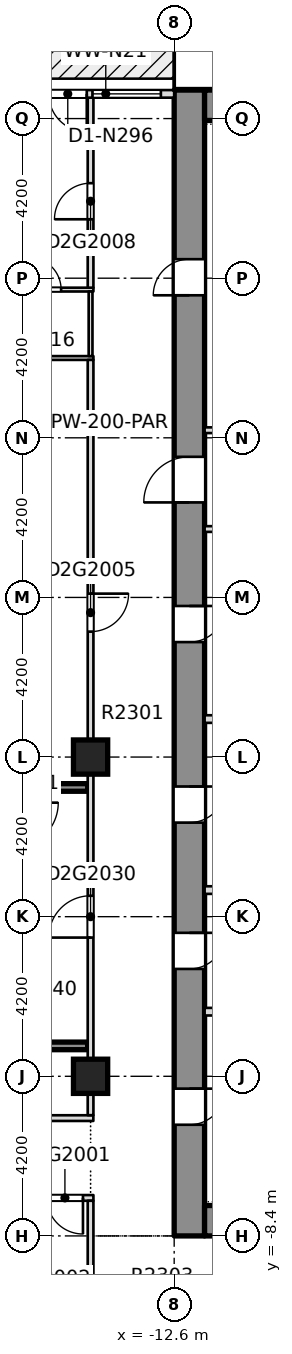
"""IFC4 building model, lengths in metres.
Left out: names, types, materials, properties, quantities, classifications, styles, units other than length and angle.
Written with IfcOpenShell. Run it as: python <this file> out.ifc"""

import sys

from ifc_helpers import new_model, si_unit, direction, frame, frame_2d, origin, origin_2d, place, context, subcontext, project, spatial, rectangle, extrude, element, fill, save


model = new_model("IFC4")
c1 = context("Model", 3, precision=1e-05, world=origin(), true_north=direction((0.0, 1.0)))
c2 = subcontext(c1, "Body", "Model", "MODEL_VIEW")
j1 = project(units=[si_unit("LENGTHUNIT", "METRE"), si_unit("PLANEANGLEUNIT", "RADIAN")], contexts=[c1])
p1 = place(None, origin())
s1 = spatial("IfcSite", under=j1, at=p1, CompositionType="ELEMENT")
p2 = place(p1, origin())
s2 = spatial("IfcBuilding", under=s1, at=p2, CompositionType="ELEMENT")
p3 = place(p2, frame((0.0, 0.0, 94.2)))
s3 = spatial("IfcBuildingStorey", under=s2, at=p3, CompositionType="ELEMENT", Elevation=94.2)
p4 = place(p3, frame((-12.2, -8.4, -0.32), z_axis=(0.0, 0.0, 1.0), x_axis=(0.0, 1.0, 0.0)))
e1 = element("IfcWall", 1, at=p4, inside=s3, PredefinedType="SHEAR", context=c2, shape_type="SweptSolid", body=[
    extrude(rectangle(XDim=30.15, YDim=0.8, at=frame_2d((15.075, 0.0))), origin(), (0.0, 0.0, 1.0), 3.45),
])
p5 = place(p4, frame((2.925, 0.0, 0.32)))
e2 = element("IfcOpeningElement", 2, at=p5, cuts=e1, PredefinedType="OPENING", context=c2, shape_type="SweptSolid", body=[
    extrude(rectangle(XDim=0.95, YDim=2.1, at=frame_2d((0.475, 1.05))), frame((0.0, 0.41, 0.0), z_axis=(0.0, -1.0, 0.0), x_axis=(1.0, 0.0, 0.0)), (0.0, 0.0, 1.0), 0.82),
])
p6 = place(p4, frame((7.025, 0.0, 0.32)))
e3 = element("IfcOpeningElement", 3, at=p6, cuts=e1, PredefinedType="OPENING", context=c2, shape_type="SweptSolid", body=[
    extrude(rectangle(XDim=0.95, YDim=2.1, at=frame_2d((0.475, 1.05))), frame((0.0, 0.41, 0.0), z_axis=(0.0, -1.0, 0.0), x_axis=(1.0, 0.0, 0.0)), (0.0, 0.0, 1.0), 0.82),
])
p7 = place(p4, frame((10.875, 0.0, 0.32)))
e4 = element("IfcOpeningElement", 4, at=p7, cuts=e1, PredefinedType="OPENING", context=c2, shape_type="SweptSolid", body=[
    extrude(rectangle(XDim=0.95, YDim=2.1, at=frame_2d((0.475, 1.05))), frame((0.0, 0.41, 0.0), z_axis=(0.0, -1.0, 0.0), x_axis=(1.0, 0.0, 0.0)), (0.0, 0.0, 1.0), 0.82),
])
p8 = place(p4, frame((15.625, 0.0, 0.32)))
e5 = element("IfcOpeningElement", 5, at=p8, cuts=e1, PredefinedType="OPENING", context=c2, shape_type="SweptSolid", body=[
    extrude(rectangle(XDim=0.95, YDim=2.1, at=frame_2d((0.475, 1.05))), frame((0.0, 0.41, 0.0), z_axis=(0.0, -1.0, 0.0), x_axis=(1.0, 0.0, 0.0)), (0.0, 0.0, 1.0), 0.82),
])
p9 = place(p4, frame((24.75, 0.0, 0.32)))
e6 = element("IfcOpeningElement", 6, at=p9, cuts=e1, PredefinedType="OPENING", context=c2, shape_type="SweptSolid", body=[
    extrude(rectangle(XDim=0.95, YDim=2.1, at=frame_2d((0.475, 1.05))), frame((0.0, 0.41, 0.0), z_axis=(0.0, -1.0, 0.0), x_axis=(1.0, 0.0, 0.0)), (0.0, 0.0, 1.0), 0.82),
])
p10 = place(p4, frame((19.3, 0.0, 0.32)))
e7 = element("IfcOpeningElement", 7, at=p10, cuts=e1, PredefinedType="OPENING", context=c2, shape_type="SweptSolid", body=[
    extrude(rectangle(XDim=1.2, YDim=2.1, at=frame_2d((0.6, 1.05))), frame((0.0, 0.41, 0.0), z_axis=(0.0, -1.0, 0.0), x_axis=(1.0, 0.0, 0.0)), (0.0, 0.0, 1.0), 0.82),
])
p11 = place(p3, frame((-11.8, -8.0, -0.32), z_axis=(0.0, 0.0, 1.0), x_axis=(1.0, 0.0, 0.0)))
e8 = element("IfcWall", 8, at=p11, inside=s3, PredefinedType="SHEAR", context=c2, shape_type="SweptSolid", body=[
    extrude(rectangle(XDim=23.6, YDim=0.8, at=frame_2d((11.8, 0.0))), origin(), (0.0, 0.0, 1.0), 3.45),
])
p12 = place(p11, frame((7.05, 0.0, 0.32)))
e9 = element("IfcOpeningElement", 9, at=p12, cuts=e8, PredefinedType="OPENING", context=c2, shape_type="SweptSolid", body=[
    extrude(rectangle(XDim=1.8, YDim=2.1, at=frame_2d((0.9, 1.05))), frame((0.0, 0.41, 0.0), z_axis=(0.0, -1.0, 0.0), x_axis=(1.0, 0.0, 0.0)), (0.0, 0.0, 1.0), 0.82),
])
p13 = place(p11, frame((14.75, 0.0, 0.32)))
e10 = element("IfcOpeningElement", 10, at=p13, cuts=e8, PredefinedType="OPENING", context=c2, shape_type="SweptSolid", body=[
    extrude(rectangle(XDim=1.8, YDim=2.1, at=frame_2d((0.9, 1.05))), frame((0.0, 0.41, 0.0), z_axis=(0.0, -1.0, 0.0), x_axis=(1.0, 0.0, 0.0)), (0.0, 0.0, 1.0), 0.82),
])
p14 = place(p3, frame((-11.8, 21.35, -0.32), z_axis=(0.0, 0.0, 1.0), x_axis=(1.0, 0.0, 0.0)))
e11 = element("IfcWall", 11, at=p14, inside=s3, PredefinedType="SHEAR", context=c2, shape_type="SweptSolid", body=[
    extrude(rectangle(XDim=23.6, YDim=0.8, at=frame_2d((11.8, 0.0))), origin(), (0.0, 0.0, 1.0), 3.45),
])
for number, where, z_axis, x_axis in (
    (12, (-14.8, -4.2, -0.32), (0.0, 0.0, 1.0), (1.0, 0.0, 0.0)),
    (13, (-14.8, 4.2, -0.32), (0.0, 0.0, 1.0), (1.0, 0.0, 0.0)),
):
    element("IfcColumn", number, at=place(p3, frame(where, z_axis=z_axis, x_axis=x_axis)), inside=s3, PredefinedType="COLUMN", context=c2, shape_type="SweptSolid", body=[
        extrude(rectangle(XDim=0.9, YDim=0.9, at=origin_2d()), origin(), (0.0, 0.0, 1.0), 3.45),
    ])
p15 = place(p3, frame((-25.75, -7.4, 0.0), z_axis=(0.0, 0.0, 1.0), x_axis=(1.0, 0.0, 0.0)))
e14 = element("IfcWall", 14, at=p15, inside=s3, PredefinedType="PARTITIONING", context=c2, shape_type="SweptSolid", body=[
    extrude(rectangle(XDim=11.025, YDim=0.15, at=frame_2d((5.512, 0.0))), origin(), (0.0, 0.0, 1.0), 3.13),
])
p16 = place(p15, frame((9.8, 0.0, 0.0)))
e15 = element("IfcOpeningElement", 15, at=p16, cuts=e14, PredefinedType="OPENING", context=c2, shape_type="SweptSolid", body=[
    extrude(rectangle(XDim=0.95, YDim=2.1, at=frame_2d((0.475, 1.05))), frame((0.0, 0.085, 0.0), z_axis=(0.0, -1.0, 0.0), x_axis=(1.0, 0.0, 0.0)), (0.0, 0.0, 1.0), 0.17),
])
p17 = place(p3, frame((-25.75, -5.3, 0.0), z_axis=(0.0, 0.0, 1.0), x_axis=(1.0, 0.0, 0.0)))
e16 = element("IfcWall", 16, at=p17, inside=s3, PredefinedType="PARTITIONING", context=c2, shape_type="SweptSolid", body=[
    extrude(rectangle(XDim=11.023, YDim=0.15, at=frame_2d((5.511, 0.0))), origin(), (0.0, 0.0, 1.0), 3.13),
])
p18 = place(p3, frame((-20.4, -3.4, 0.0), z_axis=(0.0, 0.0, 1.0), x_axis=(1.0, 0.0, 0.0)))
e17 = element("IfcWall", 17, at=p18, inside=s3, PredefinedType="SOLIDWALL", context=c2, shape_type="SweptSolid", body=[
    extrude(rectangle(XDim=5.523, YDim=0.2, at=frame_2d((2.761, 0.0))), origin(), (0.0, 0.0, 1.0), 3.13),
])
p19 = place(p3, frame((-20.45, 3.4, 0.0), z_axis=(0.0, 0.0, 1.0), x_axis=(1.0, 0.0, 0.0)))
e18 = element("IfcWall", 18, at=p19, inside=s3, PredefinedType="SOLIDWALL", context=c2, shape_type="SweptSolid", body=[
    extrude(rectangle(XDim=5.575, YDim=0.2, at=frame_2d((2.788, 0.0))), origin(), (0.0, 0.0, 1.0), 3.13),
])
p20 = place(p3, frame((-17.25, 14.7, 0.0), z_axis=(0.0, 0.0, 1.0), x_axis=(1.0, 0.0, 0.0)))
e19 = element("IfcWall", 19, at=p20, inside=s3, PredefinedType="PARTITIONING", context=c2, shape_type="SweptSolid", body=[
    extrude(rectangle(XDim=2.525, YDim=0.1, at=frame_2d((1.262, 0.0))), origin(), (0.0, 0.0, 1.0), 3.13),
])
p21 = place(p3, frame((-17.25, 16.5, 0.0), z_axis=(0.0, 0.0, 1.0), x_axis=(1.0, 0.0, 0.0)))
e20 = element("IfcWall", 20, at=p21, inside=s3, PredefinedType="PARTITIONING", context=c2, shape_type="SweptSolid", body=[
    extrude(rectangle(XDim=2.525, YDim=0.1, at=frame_2d((1.262, 0.0))), origin(), (0.0, 0.0, 1.0), 3.13),
])
p22 = place(p21, frame((0.825, 0.0, 0.0)))
e21 = element("IfcOpeningElement", 21, at=p22, cuts=e20, PredefinedType="OPENING", context=c2, shape_type="SweptSolid", body=[
    extrude(rectangle(XDim=0.85, YDim=2.1, at=frame_2d((0.425, 1.05))), frame((0.0, 0.06, 0.0), z_axis=(0.0, -1.0, 0.0), x_axis=(1.0, 0.0, 0.0)), (0.0, 0.0, 1.0), 0.12),
])
p23 = place(p3, frame((-14.8, -10.6, 0.0), z_axis=(0.0, 0.0, 1.0), x_axis=(0.0, 1.0, 0.0)))
e22 = element("IfcWall", 22, at=p23, inside=s3, PredefinedType="PARTITIONING", context=c2, shape_type="SweptSolid", body=[
    extrude(rectangle(XDim=3.125, YDim=0.15, at=frame_2d((1.562, 0.0))), origin(), (0.0, 0.0, 1.0), 3.13),
])
p24 = place(p3, frame((-14.8, -5.223, 0.0), z_axis=(0.0, 0.0, 1.0), x_axis=(0.0, 1.0, 0.0)))
e23 = element("IfcWall", 23, at=p24, inside=s3, PredefinedType="PARTITIONING", context=c2, shape_type="SweptSolid", body=[
    extrude(rectangle(XDim=19.873, YDim=0.15, at=frame_2d((9.937, 0.0))), origin(), (0.0, 0.0, 1.0), 3.13),
])
p25 = place(p24, frame((12.723, 0.0, 0.0)))
e24 = element("IfcOpeningElement", 24, at=p25, cuts=e23, PredefinedType="OPENING", context=c2, shape_type="SweptSolid", body=[
    extrude(rectangle(XDim=1.0, YDim=2.1, at=frame_2d((0.5, 1.05))), frame((0.0, 0.085, 0.0), z_axis=(0.0, -1.0, 0.0), x_axis=(1.0, 0.0, 0.0)), (0.0, 0.0, 1.0), 0.17),
])
p26 = place(p24, frame((4.673, 0.0, 0.0)))
e25 = element("IfcOpeningElement", 25, at=p26, cuts=e23, PredefinedType="OPENING", context=c2, shape_type="SweptSolid", body=[
    extrude(rectangle(XDim=1.1, YDim=2.1, at=frame_2d((0.55, 1.05))), frame((0.0, 0.085, 0.0), z_axis=(0.0, -1.0, 0.0), x_axis=(1.0, 0.0, 0.0)), (0.0, 0.0, 1.0), 0.17),
])
p27 = place(p3, frame((-14.8, 14.75, 0.0), z_axis=(0.0, 0.0, 1.0), x_axis=(0.0, 1.0, 0.0)))
e26 = element("IfcWall", 26, at=p27, inside=s3, PredefinedType="PARTITIONING", context=c2, shape_type="SweptSolid", body=[
    extrude(rectangle(XDim=1.7, YDim=0.1, at=frame_2d((0.85, 0.0))), origin(), (0.0, 0.0, 1.0), 3.13),
])
p28 = place(p3, frame((-14.8, 16.55, 0.0), z_axis=(0.0, 0.0, 1.0), x_axis=(0.0, 1.0, 0.0)))
e27 = element("IfcWall", 27, at=p28, inside=s3, PredefinedType="PARTITIONING", context=c2, shape_type="SweptSolid", body=[
    extrude(rectangle(XDim=5.0, YDim=0.15, at=frame_2d((2.5, 0.0))), origin(), (0.0, 0.0, 1.0), 3.13),
])
p29 = place(p28, frame((1.8, 0.0, 0.0)))
e28 = element("IfcOpeningElement", 28, at=p29, cuts=e27, PredefinedType="OPENING", context=c2, shape_type="SweptSolid", body=[
    extrude(rectangle(XDim=0.95, YDim=2.1, at=frame_2d((0.475, 1.05))), frame((0.0, 0.085, 0.0), z_axis=(0.0, -1.0, 0.0), x_axis=(1.0, 0.0, 0.0)), (0.0, 0.0, 1.0), 0.17),
])
p30 = place(p3, frame((-12.6, 21.65, 0.0), z_axis=(0.0, 0.0, 1.0), x_axis=(-1.0, 0.0, 0.0)))
e29 = element("IfcWall", 29, at=p30, inside=s3, PredefinedType="STANDARD", context=c2, shape_type="SweptSolid", body=[
    extrude(rectangle(XDim=3.6, YDim=0.2, at=frame_2d((1.8, 0.0))), origin(), (0.0, 0.0, 1.0), 3.13),
])
p31 = place(p30, frame((0.35, 0.0, 0.2)))
e30 = element("IfcOpeningElement", 30, at=p31, cuts=e29, PredefinedType="OPENING", context=c2, shape_type="SweptSolid", body=[
    extrude(rectangle(XDim=1.8, YDim=2.65, at=frame_2d((0.9, 1.325))), frame((0.0, 0.11, 0.0), z_axis=(0.0, -1.0, 0.0), x_axis=(1.0, 0.0, 0.0)), (0.0, 0.0, 1.0), 0.22),
])
p32 = place(p30, frame((2.3, 0.0, 0.0)))
e31 = element("IfcOpeningElement", 31, at=p32, cuts=e29, PredefinedType="OPENING", context=c2, shape_type="SweptSolid", body=[
    extrude(rectangle(XDim=1.0, YDim=2.4, at=frame_2d((0.5, 1.2))), frame((0.0, 0.11, 0.0), z_axis=(0.0, -1.0, 0.0), x_axis=(1.0, 0.0, 0.0)), (0.0, 0.0, 1.0), 0.22),
])
for number, where, z_axis, x_axis in (
    (32, (-11.799, -2.5, 0.0), (0.0, 0.0, 1.0), (1.0, 0.0, 0.0)),
    (33, (-11.799, 0.7, 0.0), (0.0, 0.0, 1.0), (1.0, 0.0, 0.0)),
    (34, (-11.799, 5.2, 0.0), (0.0, 0.0, 1.0), (1.0, 0.0, 0.0)),
):
    element("IfcWall", number, at=place(p3, frame(where, z_axis=z_axis, x_axis=x_axis)), inside=s3, PredefinedType="PARTITIONING", context=c2, shape_type="SweptSolid", body=[
        extrude(rectangle(XDim=2.998, YDim=0.2, at=frame_2d((1.499, 0.0))), origin(), (0.0, 0.0, 1.0), 3.13),
    ])
for number, where, z_axis, x_axis in (
    (35, (-11.799, 10.2, 0.0), (0.0, 0.0, 1.0), (1.0, 0.0, 0.0)),
    (36, (-11.799, 12.8, 0.0), (0.0, 0.0, 1.0), (1.0, 0.0, 0.0)),
):
    element("IfcWall", number, at=place(p3, frame(where, z_axis=z_axis, x_axis=x_axis)), inside=s3, PredefinedType="PARTITIONING", context=c2, shape_type="SweptSolid", body=[
        extrude(rectangle(XDim=2.998, YDim=0.15, at=frame_2d((1.499, 0.0))), origin(), (0.0, 0.0, 1.0), 3.13),
    ])
p33 = place(p16, origin())
e37 = element("IfcDoor", 37, at=p33, inside=s3, OperationType="SINGLE_SWING_RIGHT", PredefinedType="DOOR", context=c2, shape_type="SweptSolid", body=[
    extrude(rectangle(XDim=0.95, YDim=2.1, at=frame_2d((0.475, 1.05))), frame((0.0, 0.025, 0.0), z_axis=(0.0, -1.0, 0.0), x_axis=(1.0, 0.0, 0.0)), (0.0, 0.0, 1.0), 0.05),
])
fill(e15, e37)
p34 = place(p25, origin())
e38 = element("IfcDoor", 38, at=p34, inside=s3, OperationType="SINGLE_SWING_RIGHT", PredefinedType="DOOR", context=c2, shape_type="SweptSolid", body=[
    extrude(rectangle(XDim=1.0, YDim=2.1, at=frame_2d((0.5, 1.05))), frame((0.0, 0.025, 0.0), z_axis=(0.0, -1.0, 0.0), x_axis=(1.0, 0.0, 0.0)), (0.0, 0.0, 1.0), 0.05),
])
fill(e24, e38)
p35 = place(p29, origin())
e39 = element("IfcDoor", 39, at=p35, inside=s3, OperationType="SINGLE_SWING_RIGHT", PredefinedType="DOOR", context=c2, shape_type="SweptSolid", body=[
    extrude(rectangle(XDim=0.95, YDim=2.1, at=frame_2d((0.475, 1.05))), frame((0.0, 0.025, 0.0), z_axis=(0.0, -1.0, 0.0), x_axis=(1.0, 0.0, 0.0)), (0.0, 0.0, 1.0), 0.05),
])
fill(e28, e39)
p36 = place(p22, origin())
e40 = element("IfcDoor", 40, at=p36, inside=s3, OperationType="SINGLE_SWING_RIGHT", PredefinedType="DOOR", context=c2, shape_type="SweptSolid", body=[
    extrude(rectangle(XDim=0.85, YDim=2.1, at=frame_2d((0.425, 1.05))), frame((0.0, 0.025, 0.0), z_axis=(0.0, -1.0, 0.0), x_axis=(1.0, 0.0, 0.0)), (0.0, 0.0, 1.0), 0.05),
])
fill(e21, e40)
p37 = place(p26, origin())
e41 = element("IfcDoor", 41, at=p37, inside=s3, OperationType="SINGLE_SWING_LEFT", PredefinedType="DOOR", context=c2, shape_type="SweptSolid", body=[
    extrude(rectangle(XDim=1.1, YDim=2.1, at=frame_2d((0.55, 1.05))), frame((0.0, 0.025, 0.0), z_axis=(0.0, -1.0, 0.0), x_axis=(1.0, 0.0, 0.0)), (0.0, 0.0, 1.0), 0.05),
])
fill(e25, e41)
p38 = place(p31, origin())
e42 = element("IfcWindow", 42, at=p38, inside=s3, PartitioningType="SINGLE_PANEL", PredefinedType="WINDOW", context=c2, shape_type="SweptSolid", body=[
    extrude(rectangle(XDim=1.8, YDim=2.65, at=frame_2d((0.9, 1.325))), frame((0.0, 0.03, 0.0), z_axis=(0.0, -1.0, 0.0), x_axis=(1.0, 0.0, 0.0)), (0.0, 0.0, 1.0), 0.06),
])
fill(e30, e42)
p39 = place(p32, origin())
e43 = element("IfcDoor", 43, at=p39, inside=s3, OperationType="SINGLE_SWING_LEFT", PredefinedType="DOOR", context=c2, shape_type="SweptSolid", body=[
    extrude(rectangle(XDim=1.0, YDim=2.4, at=frame_2d((0.5, 1.2))), frame((0.0, 0.025, 0.0), z_axis=(0.0, -1.0, 0.0), x_axis=(1.0, 0.0, 0.0)), (0.0, 0.0, 1.0), 0.05),
])
fill(e31, e43)
p40 = place(p5, origin())
e44 = element("IfcDoor", 44, at=p40, inside=s3, OperationType="SINGLE_SWING_LEFT", PredefinedType="DOOR", context=c2, shape_type="SweptSolid", body=[
    extrude(rectangle(XDim=0.95, YDim=2.1, at=frame_2d((0.475, 1.05))), frame((0.0, 0.025, 0.0), z_axis=(0.0, -1.0, 0.0), x_axis=(1.0, 0.0, 0.0)), (0.0, 0.0, 1.0), 0.05),
])
fill(e2, e44)
p41 = place(p6, origin())
e45 = element("IfcDoor", 45, at=p41, inside=s3, OperationType="SINGLE_SWING_LEFT", PredefinedType="DOOR", context=c2, shape_type="SweptSolid", body=[
    extrude(rectangle(XDim=0.95, YDim=2.1, at=frame_2d((0.475, 1.05))), frame((0.0, 0.025, 0.0), z_axis=(0.0, -1.0, 0.0), x_axis=(1.0, 0.0, 0.0)), (0.0, 0.0, 1.0), 0.05),
])
fill(e3, e45)
p42 = place(p7, origin())
e46 = element("IfcDoor", 46, at=p42, inside=s3, OperationType="SINGLE_SWING_LEFT", PredefinedType="DOOR", context=c2, shape_type="SweptSolid", body=[
    extrude(rectangle(XDim=0.95, YDim=2.1, at=frame_2d((0.475, 1.05))), frame((0.0, 0.025, 0.0), z_axis=(0.0, -1.0, 0.0), x_axis=(1.0, 0.0, 0.0)), (0.0, 0.0, 1.0), 0.05),
])
fill(e4, e46)
p43 = place(p8, origin())
e47 = element("IfcDoor", 47, at=p43, inside=s3, OperationType="SINGLE_SWING_LEFT", PredefinedType="DOOR", context=c2, shape_type="SweptSolid", body=[
    extrude(rectangle(XDim=0.95, YDim=2.1, at=frame_2d((0.475, 1.05))), frame((0.0, 0.025, 0.0), z_axis=(0.0, -1.0, 0.0), x_axis=(1.0, 0.0, 0.0)), (0.0, 0.0, 1.0), 0.05),
])
fill(e5, e47)
p44 = place(p9, origin())
e48 = element("IfcDoor", 48, at=p44, inside=s3, OperationType="SINGLE_SWING_LEFT", PredefinedType="DOOR", context=c2, shape_type="SweptSolid", body=[
    extrude(rectangle(XDim=0.95, YDim=2.1, at=frame_2d((0.475, 1.05))), frame((0.0, 0.025, 0.0), z_axis=(0.0, -1.0, 0.0), x_axis=(1.0, 0.0, 0.0)), (0.0, 0.0, 1.0), 0.05),
])
fill(e6, e48)
p45 = place(p10, origin())
e49 = element("IfcDoor", 49, at=p45, inside=s3, OperationType="SINGLE_SWING_LEFT", PredefinedType="DOOR", context=c2, shape_type="SweptSolid", body=[
    extrude(rectangle(XDim=1.2, YDim=2.1, at=frame_2d((0.6, 1.05))), frame((0.0, 0.025, 0.0), z_axis=(0.0, -1.0, 0.0), x_axis=(1.0, 0.0, 0.0)), (0.0, 0.0, 1.0), 0.05),
])
fill(e7, e49)
save(model, sys.argv[1])
